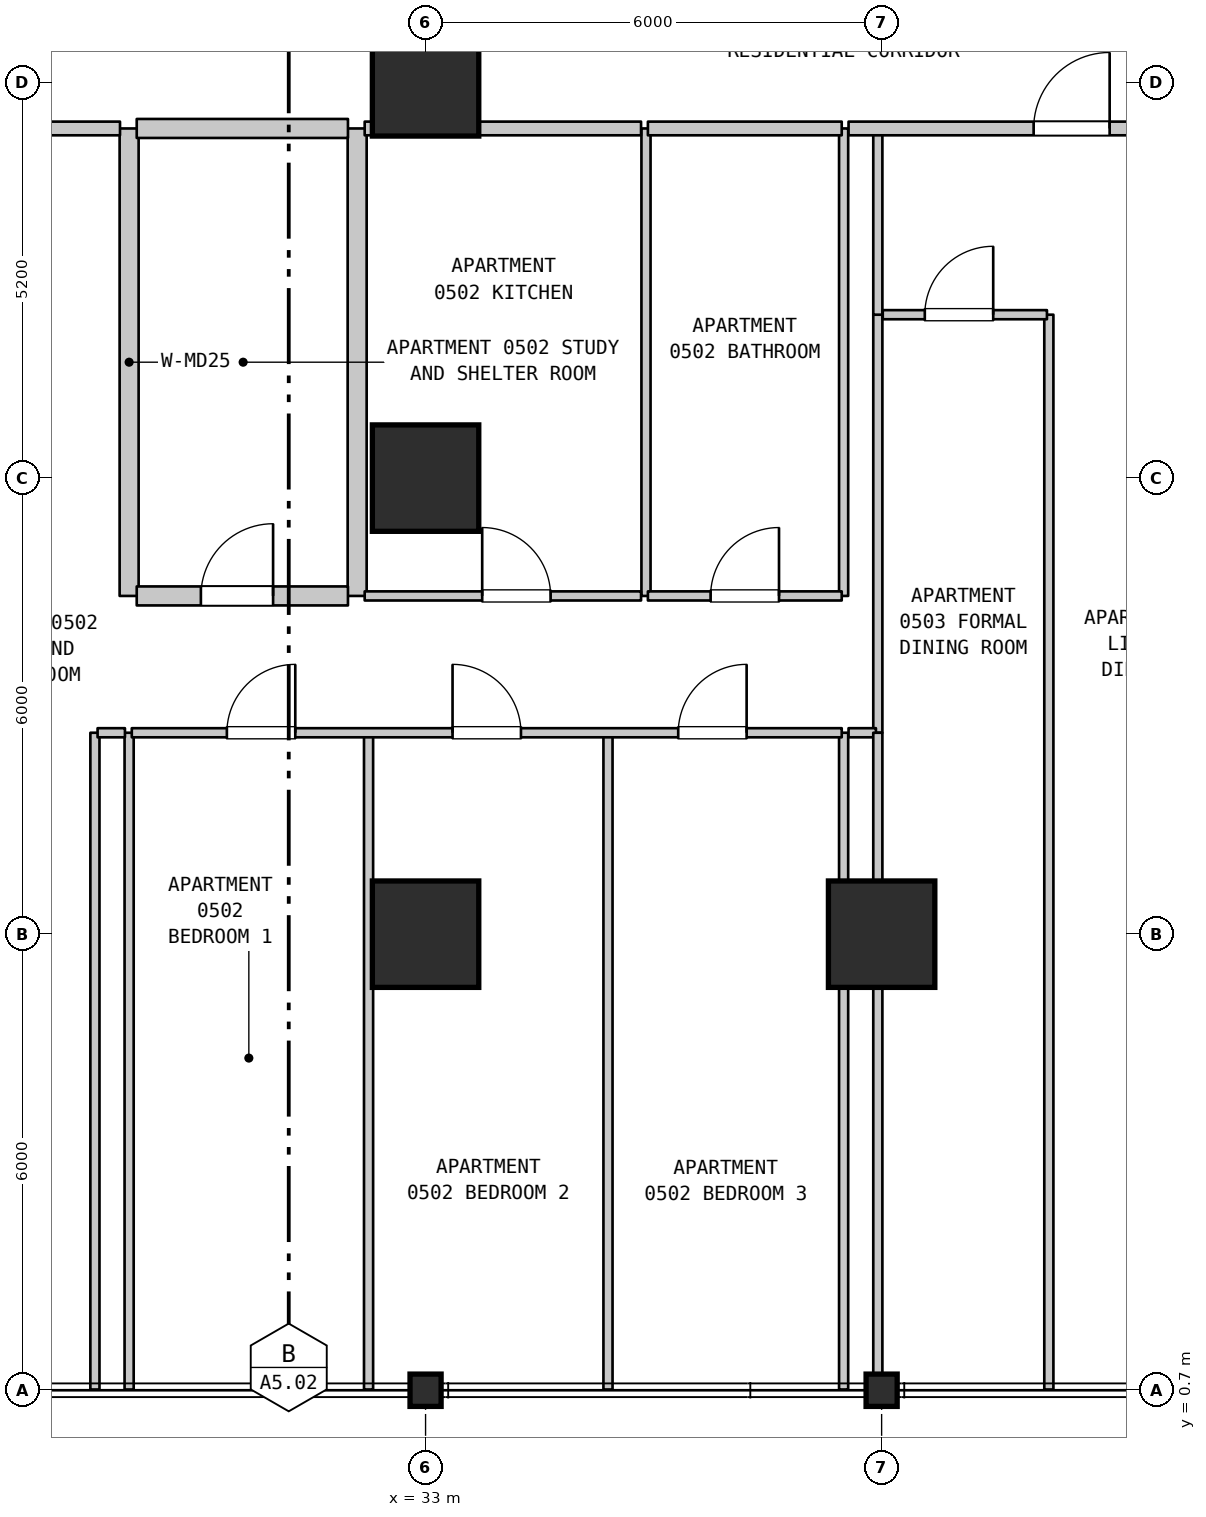
"""IFC4 building model, lengths in metres.
Left out: names, types, materials, properties, quantities, classifications, styles, units other than length and angle.
Written with IfcOpenShell. Run it as: python <this file> out.ifc"""

import sys

from ifc_helpers import new_model, si_unit, direction, frame, frame_2d, origin, origin_2d, place, context, subcontext, project, spatial, rectangle, i_section, extrude, element, fill, save


model = new_model("IFC4")
c1 = context("Model", 3, precision=1e-05, world=origin(), true_north=direction((0.0, 1.0)))
c2 = subcontext(c1, "Body", "Model", "MODEL_VIEW")
j1 = project(units=[si_unit("LENGTHUNIT", "METRE"), si_unit("PLANEANGLEUNIT", "RADIAN")], contexts=[c1])
p1 = place(None, origin())
s1 = spatial("IfcSite", under=j1, at=p1, CompositionType="ELEMENT")
p2 = place(p1, origin())
s2 = spatial("IfcBuilding", under=s1, at=p2, CompositionType="ELEMENT")
p3 = place(p2, frame((0.0, 0.0, 27.7)))
s3 = spatial("IfcBuildingStorey", under=s2, at=p3, CompositionType="ELEMENT", Elevation=27.7)
p4 = place(p3, frame((33.0, 0.7, 0.0), z_axis=(0.0, 0.0, 1.0), x_axis=(1.0, 0.0, 0.0)))
e1 = element("IfcColumn", 1, at=p4, inside=s3, PredefinedType="COLUMN", context=c2, shape_type="SweptSolid", body=[
    extrude(i_section(OverallWidth=0.409, OverallDepth=0.425, WebThickness=0.032, FlangeThickness=0.052, FilletRadius=0.015, at=origin_2d()), origin(), (0.0, 0.0, 1.0), 3.7),
])
for number, where, z_axis, x_axis in (
    (2, (33.0, 6.7, 0.0), (0.0, 0.0, 1.0), (1.0, 0.0, 0.0)),
    (3, (33.0, 12.7, 0.0), (0.0, 0.0, 1.0), (1.0, 0.0, 0.0)),
    (4, (33.0, 17.9, 0.0), (0.0, 0.0, 1.0), (1.0, 0.0, 0.0)),
):
    element("IfcColumn", number, at=place(p3, frame(where, z_axis=z_axis, x_axis=x_axis)), inside=s3, PredefinedType="COLUMN", context=c2, shape_type="SweptSolid", body=[
        extrude(rectangle(XDim=1.4, YDim=1.4, at=origin_2d()), origin(), (0.0, 0.0, 1.0), 3.7),
    ])
p5 = place(p3, frame((39.0, 0.7, 0.0), z_axis=(0.0, 0.0, 1.0), x_axis=(1.0, 0.0, 0.0)))
e5 = element("IfcColumn", 5, at=p5, inside=s3, PredefinedType="COLUMN", context=c2, shape_type="SweptSolid", body=[
    extrude(i_section(OverallWidth=0.409, OverallDepth=0.425, WebThickness=0.032, FlangeThickness=0.052, FilletRadius=0.015, at=origin_2d()), origin(), (0.0, 0.0, 1.0), 3.7),
])
p6 = place(p3, frame((39.0, 6.7, 0.0), z_axis=(0.0, 0.0, 1.0), x_axis=(1.0, 0.0, 0.0)))
e6 = element("IfcColumn", 6, at=p6, inside=s3, PredefinedType="COLUMN", context=c2, shape_type="SweptSolid", body=[
    extrude(rectangle(XDim=1.4, YDim=1.4, at=origin_2d()), origin(), (0.0, 0.0, 1.0), 3.7),
])
for number, where, z_axis, x_axis in (
    (7, (28.65, 0.71, 0.0), (0.0, 0.0, 1.0), (0.0, 1.0, 0.0)),
    (8, (29.1, 0.71, 0.0), (0.0, 0.0, 1.0), (0.0, 1.0, 0.0)),
):
    element("IfcWall", number, at=place(p3, frame(where, z_axis=z_axis, x_axis=x_axis)), inside=s3, PredefinedType="PARTITIONING", context=c2, shape_type="SweptSolid", body=[
        extrude(rectangle(XDim=8.64, YDim=0.12, at=frame_2d((4.32, 0.0))), origin(), (0.0, 0.0, 1.0), 3.385),
    ])
for number, where, z_axis, x_axis in (
    (9, (29.1, 11.15, 0.0), (0.0, 0.0, 1.0), (0.0, 1.0, 0.0)),
    (10, (32.1, 11.15, 0.0), (0.0, 0.0, 1.0), (0.0, 1.0, 0.0)),
):
    element("IfcWall", number, at=place(p3, frame(where, z_axis=z_axis, x_axis=x_axis)), inside=s3, PredefinedType="STANDARD", context=c2, shape_type="SweptSolid", body=[
        extrude(rectangle(XDim=6.15, YDim=0.25, at=frame_2d((3.075, 0.0))), origin(), (0.0, 0.0, 1.0), 3.385),
    ])
for number, where, z_axis, x_axis in (
    (11, (32.25, 0.71, 0.0), (0.0, 0.0, 1.0), (0.0, 1.0, 0.0)),
    (12, (35.4, 0.71, 0.0), (0.0, 0.0, 1.0), (0.0, 1.0, 0.0)),
):
    element("IfcWall", number, at=place(p3, frame(where, z_axis=z_axis, x_axis=x_axis)), inside=s3, PredefinedType="PARTITIONING", context=c2, shape_type="SweptSolid", body=[
        extrude(rectangle(XDim=8.64, YDim=0.12, at=frame_2d((4.32, 0.0))), origin(), (0.0, 0.0, 1.0), 3.385),
    ])
p7 = place(p3, frame((35.9, 11.15, 0.0), z_axis=(0.0, 0.0, 1.0), x_axis=(0.0, 1.0, 0.0)))
e13 = element("IfcWall", 13, at=p7, inside=s3, PredefinedType="PARTITIONING", context=c2, shape_type="SweptSolid", body=[
    extrude(rectangle(XDim=6.15, YDim=0.12, at=frame_2d((3.075, 0.0))), origin(), (0.0, 0.0, 1.0), 3.385),
])
p8 = place(p3, frame((38.5, 0.71, 0.0), z_axis=(0.0, 0.0, 1.0), x_axis=(0.0, 1.0, 0.0)))
e14 = element("IfcWall", 14, at=p8, inside=s3, PredefinedType="PARTITIONING", context=c2, shape_type="SweptSolid", body=[
    extrude(rectangle(XDim=8.64, YDim=0.12, at=frame_2d((4.32, 0.0))), origin(), (0.0, 0.0, 1.0), 3.385),
])
p9 = place(p3, frame((38.5, 11.15, 0.0), z_axis=(0.0, 0.0, 1.0), x_axis=(0.0, 1.0, 0.0)))
e15 = element("IfcWall", 15, at=p9, inside=s3, PredefinedType="PARTITIONING", context=c2, shape_type="SweptSolid", body=[
    extrude(rectangle(XDim=6.15, YDim=0.12, at=frame_2d((3.075, 0.0))), origin(), (0.0, 0.0, 1.0), 3.385),
])
p10 = place(p3, frame((38.95, 0.71, 0.0), z_axis=(0.0, 0.0, 1.0), x_axis=(0.0, 1.0, 0.0)))
e16 = element("IfcWall", 16, at=p10, inside=s3, PredefinedType="PARTITIONING", context=c2, shape_type="SweptSolid", body=[
    extrude(rectangle(XDim=5.99, YDim=0.12, at=frame_2d((2.995, 0.0))), origin(), (0.0, 0.0, 1.0), 2.885),
])
p11 = place(p3, frame((38.95, 9.35, 0.0), z_axis=(0.0, 0.0, 1.0), x_axis=(0.0, 1.0, 0.0)))
e17 = element("IfcWall", 17, at=p11, inside=s3, PredefinedType="PARTITIONING", context=c2, shape_type="SweptSolid", body=[
    extrude(rectangle(XDim=5.5, YDim=0.12, at=frame_2d((2.75, 0.0))), origin(), (0.0, 0.0, 1.0), 3.385),
])
p12 = place(p3, frame((38.95, 14.85, 0.0), z_axis=(0.0, 0.0, 1.0), x_axis=(0.0, 1.0, 0.0)))
e18 = element("IfcWall", 18, at=p12, inside=s3, PredefinedType="PARTITIONING", context=c2, shape_type="SweptSolid", body=[
    extrude(rectangle(XDim=2.45, YDim=0.12, at=frame_2d((1.225, 0.0))), origin(), (0.0, 0.0, 1.0), 3.385),
])
p13 = place(p3, frame((41.2, 0.71, 0.0), z_axis=(0.0, 0.0, 1.0), x_axis=(0.0, 1.0, 0.0)))
e19 = element("IfcWall", 19, at=p13, inside=s3, PredefinedType="PARTITIONING", context=c2, shape_type="SweptSolid", body=[
    extrude(rectangle(XDim=14.14, YDim=0.12, at=frame_2d((7.07, 0.0))), origin(), (0.0, 0.0, 1.0), 3.385),
])
p14 = place(p3, frame((28.685, 9.35, 0.0), z_axis=(0.0, 0.0, 1.0), x_axis=(1.0, 0.0, 0.0)))
e20 = element("IfcWall", 20, at=p14, inside=s3, PredefinedType="PARTITIONING", context=c2, shape_type="SweptSolid", body=[
    extrude(rectangle(XDim=0.36, YDim=0.12, at=frame_2d((0.18, 0.0))), origin(), (0.0, 0.0, 1.0), 3.385),
])
p15 = place(p3, frame((29.135, 9.35, 0.0), z_axis=(0.0, 0.0, 1.0), x_axis=(1.0, 0.0, 0.0)))
e21 = element("IfcWall", 21, at=p15, inside=s3, PredefinedType="PARTITIONING", context=c2, shape_type="SweptSolid", body=[
    extrude(rectangle(XDim=9.34, YDim=0.12, at=frame_2d((4.67, 0.0))), origin(), (0.0, 0.0, 1.0), 3.385),
])
p16 = place(p15, frame((1.251, 0.0, 0.0)))
e22 = element("IfcOpeningElement", 22, at=p16, cuts=e21, PredefinedType="OPENING", context=c2, shape_type="SweptSolid", body=[
    extrude(rectangle(XDim=0.9, YDim=2.15, at=frame_2d((0.45, 1.075))), frame((0.0, 0.07, 0.0), z_axis=(0.0, -1.0, 0.0), x_axis=(1.0, 0.0, 0.0)), (0.0, 0.0, 1.0), 0.14),
])
p17 = place(p15, frame((4.22, 0.0, 0.0)))
e23 = element("IfcOpeningElement", 23, at=p17, cuts=e21, PredefinedType="OPENING", context=c2, shape_type="SweptSolid", body=[
    extrude(rectangle(XDim=0.9, YDim=2.15, at=frame_2d((0.45, 1.075))), frame((0.0, 0.07, 0.0), z_axis=(0.0, -1.0, 0.0), x_axis=(1.0, 0.0, 0.0)), (0.0, 0.0, 1.0), 0.14),
])
p18 = place(p15, frame((7.189, 0.0, 0.0)))
e24 = element("IfcOpeningElement", 24, at=p18, cuts=e21, PredefinedType="OPENING", context=c2, shape_type="SweptSolid", body=[
    extrude(rectangle(XDim=0.9, YDim=2.15, at=frame_2d((0.45, 1.075))), frame((0.0, 0.07, 0.0), z_axis=(0.0, -1.0, 0.0), x_axis=(1.0, 0.0, 0.0)), (0.0, 0.0, 1.0), 0.14),
])
p19 = place(p3, frame((38.565, 9.35, 0.0), z_axis=(0.0, 0.0, 1.0), x_axis=(1.0, 0.0, 0.0)))
e25 = element("IfcWall", 25, at=p19, inside=s3, PredefinedType="PARTITIONING", context=c2, shape_type="SweptSolid", body=[
    extrude(rectangle(XDim=0.36, YDim=0.12, at=frame_2d((0.18, 0.0))), origin(), (0.0, 0.0, 1.0), 3.385),
])
p20 = place(p3, frame((29.2, 11.15, 0.0), z_axis=(0.0, 0.0, 1.0), x_axis=(1.0, 0.0, 0.0)))
e26 = element("IfcWall", 26, at=p20, inside=s3, PredefinedType="STANDARD", context=c2, shape_type="SweptSolid", body=[
    extrude(rectangle(XDim=2.779, YDim=0.25, at=frame_2d((1.39, 0.0))), origin(), (0.0, 0.0, 1.0), 3.385),
])
p21 = place(p20, frame((0.844, 0.0, 0.0)))
e27 = element("IfcOpeningElement", 27, at=p21, cuts=e26, PredefinedType="OPENING", context=c2, shape_type="SweptSolid", body=[
    extrude(rectangle(XDim=0.95, YDim=2.15, at=frame_2d((0.475, 1.075))), frame((0.0, 0.135, 0.0), z_axis=(0.0, -1.0, 0.0), x_axis=(1.0, 0.0, 0.0)), (0.0, 0.0, 1.0), 0.27),
])
p22 = place(p3, frame((32.199, 11.15, 0.0), z_axis=(0.0, 0.0, 1.0), x_axis=(1.0, 0.0, 0.0)))
e28 = element("IfcWall", 28, at=p22, inside=s3, PredefinedType="PARTITIONING", context=c2, shape_type="SweptSolid", body=[
    extrude(rectangle(XDim=3.636, YDim=0.12, at=frame_2d((1.818, 0.0))), origin(), (0.0, 0.0, 1.0), 3.385),
])
p23 = place(p22, frame((1.546, 0.0, 0.0)))
e29 = element("IfcOpeningElement", 29, at=p23, cuts=e28, PredefinedType="OPENING", context=c2, shape_type="SweptSolid", body=[
    extrude(rectangle(XDim=0.9, YDim=2.15, at=frame_2d((0.45, 1.075))), frame((0.0, 0.07, 0.0), z_axis=(0.0, -1.0, 0.0), x_axis=(1.0, 0.0, 0.0)), (0.0, 0.0, 1.0), 0.14),
])
p24 = place(p3, frame((35.925, 11.15, 0.0), z_axis=(0.0, 0.0, 1.0), x_axis=(1.0, 0.0, 0.0)))
e30 = element("IfcWall", 30, at=p24, inside=s3, PredefinedType="PARTITIONING", context=c2, shape_type="SweptSolid", body=[
    extrude(rectangle(XDim=2.55, YDim=0.12, at=frame_2d((1.275, 0.0))), origin(), (0.0, 0.0, 1.0), 3.385),
])
p25 = place(p24, frame((0.825, 0.0, 0.0)))
e31 = element("IfcOpeningElement", 31, at=p25, cuts=e30, PredefinedType="OPENING", context=c2, shape_type="SweptSolid", body=[
    extrude(rectangle(XDim=0.9, YDim=2.1, at=frame_2d((0.45, 1.05))), frame((0.0, 0.07, 0.0), z_axis=(0.0, -1.0, 0.0), x_axis=(1.0, 0.0, 0.0)), (0.0, 0.0, 1.0), 0.14),
])
p26 = place(p3, frame((39.015, 14.85, 0.0), z_axis=(0.0, 0.0, 1.0), x_axis=(1.0, 0.0, 0.0)))
e32 = element("IfcWall", 32, at=p26, inside=s3, PredefinedType="PARTITIONING", context=c2, shape_type="SweptSolid", body=[
    extrude(rectangle(XDim=2.16, YDim=0.12, at=frame_2d((1.08, 0.0))), origin(), (0.0, 0.0, 1.0), 3.385),
])
p27 = place(p26, frame((0.553, 0.0, 0.0)))
e33 = element("IfcOpeningElement", 33, at=p27, cuts=e32, PredefinedType="OPENING", context=c2, shape_type="SweptSolid", body=[
    extrude(rectangle(XDim=0.9, YDim=2.15, at=frame_2d((0.45, 1.075))), frame((0.0, 0.07, 0.0), z_axis=(0.0, -1.0, 0.0), x_axis=(1.0, 0.0, 0.0)), (0.0, 0.0, 1.0), 0.14),
])
p28 = place(p3, frame((23.885, 17.3, 0.0), z_axis=(0.0, 0.0, 1.0), x_axis=(1.0, 0.0, 0.0)))
e34 = element("IfcWall", 34, at=p28, inside=s3, PredefinedType="STANDARD", context=c2, shape_type="SweptSolid", body=[
    extrude(rectangle(XDim=5.095, YDim=0.18, at=frame_2d((2.547, 0.0))), origin(), (0.0, 0.0, 1.0), 3.385),
])
p29 = place(p28, frame((2.08, 0.0, 0.0)))
e35 = element("IfcOpeningElement", 35, at=p29, cuts=e34, PredefinedType="OPENING", context=c2, shape_type="SweptSolid", body=[
    extrude(rectangle(XDim=1.0, YDim=2.15, at=frame_2d((0.5, 1.075))), frame((0.0, 0.1, 0.0), z_axis=(0.0, -1.0, 0.0), x_axis=(1.0, 0.0, 0.0)), (0.0, 0.0, 1.0), 0.2),
])
p30 = place(p3, frame((29.2, 17.3, 0.0), z_axis=(0.0, 0.0, 1.0), x_axis=(1.0, 0.0, 0.0)))
e36 = element("IfcWall", 36, at=p30, inside=s3, PredefinedType="STANDARD", context=c2, shape_type="SweptSolid", body=[
    extrude(rectangle(XDim=2.779, YDim=0.25, at=frame_2d((1.39, 0.0))), origin(), (0.0, 0.0, 1.0), 3.385),
])
p31 = place(p3, frame((32.199, 17.3, 0.0), z_axis=(0.0, 0.0, 1.0), x_axis=(1.0, 0.0, 0.0)))
e37 = element("IfcWall", 37, at=p31, inside=s3, PredefinedType="STANDARD", context=c2, shape_type="SweptSolid", body=[
    extrude(rectangle(XDim=3.636, YDim=0.18, at=frame_2d((1.818, 0.0))), origin(), (0.0, 0.0, 1.0), 3.385),
])
p32 = place(p3, frame((35.925, 17.3, 0.0), z_axis=(0.0, 0.0, 1.0), x_axis=(1.0, 0.0, 0.0)))
e38 = element("IfcWall", 38, at=p32, inside=s3, PredefinedType="STANDARD", context=c2, shape_type="SweptSolid", body=[
    extrude(rectangle(XDim=2.55, YDim=0.18, at=frame_2d((1.275, 0.0))), origin(), (0.0, 0.0, 1.0), 3.385),
])
p33 = place(p3, frame((38.565, 17.3, 0.0), z_axis=(0.0, 0.0, 1.0), x_axis=(1.0, 0.0, 0.0)))
e39 = element("IfcWall", 39, at=p33, inside=s3, PredefinedType="STANDARD", context=c2, shape_type="SweptSolid", body=[
    extrude(rectangle(XDim=5.545, YDim=0.18, at=frame_2d((2.772, 0.0))), origin(), (0.0, 0.0, 1.0), 3.385),
])
p34 = place(p33, frame((2.435, 0.0, 0.0)))
e40 = element("IfcOpeningElement", 40, at=p34, cuts=e39, PredefinedType="OPENING", context=c2, shape_type="SweptSolid", body=[
    extrude(rectangle(XDim=1.0, YDim=2.15, at=frame_2d((0.5, 1.075))), frame((0.0, 0.1, 0.0), z_axis=(0.0, -1.0, 0.0), x_axis=(1.0, 0.0, 0.0)), (0.0, 0.0, 1.0), 0.2),
])
p35 = place(p3, frame((38.95, 6.7, 0.0), z_axis=(0.0, 0.0, 1.0), x_axis=(0.0, 1.0, 0.0)))
e41 = element("IfcWall", 41, at=p35, inside=s3, PredefinedType="PARTITIONING", context=c2, shape_type="SweptSolid", body=[
    extrude(rectangle(XDim=2.65, YDim=0.12, at=frame_2d((1.325, 0.0))), origin(), (0.0, 0.0, 1.0), 3.385),
])
p36 = place(p16, origin())
e42 = element("IfcDoor", 42, at=p36, inside=s3, OperationType="SINGLE_SWING_RIGHT", PredefinedType="DOOR", context=c2, shape_type="SweptSolid", body=[
    extrude(rectangle(XDim=0.9, YDim=2.15, at=frame_2d((0.45, 1.075))), frame((0.0, 0.025, 0.0), z_axis=(0.0, -1.0, 0.0), x_axis=(1.0, 0.0, 0.0)), (0.0, 0.0, 1.0), 0.05),
])
fill(e22, e42)
p37 = place(p17, origin())
e43 = element("IfcDoor", 43, at=p37, inside=s3, OperationType="SINGLE_SWING_LEFT", PredefinedType="DOOR", context=c2, shape_type="SweptSolid", body=[
    extrude(rectangle(XDim=0.9, YDim=2.15, at=frame_2d((0.45, 1.075))), frame((0.0, 0.025, 0.0), z_axis=(0.0, -1.0, 0.0), x_axis=(1.0, 0.0, 0.0)), (0.0, 0.0, 1.0), 0.05),
])
fill(e23, e43)
p38 = place(p18, origin())
e44 = element("IfcDoor", 44, at=p38, inside=s3, OperationType="SINGLE_SWING_RIGHT", PredefinedType="DOOR", context=c2, shape_type="SweptSolid", body=[
    extrude(rectangle(XDim=0.9, YDim=2.15, at=frame_2d((0.45, 1.075))), frame((0.0, 0.025, 0.0), z_axis=(0.0, -1.0, 0.0), x_axis=(1.0, 0.0, 0.0)), (0.0, 0.0, 1.0), 0.05),
])
fill(e24, e44)
p39 = place(p21, origin())
e45 = element("IfcDoor", 45, at=p39, inside=s3, OperationType="SINGLE_SWING_RIGHT", PredefinedType="DOOR", context=c2, shape_type="SweptSolid", body=[
    extrude(rectangle(XDim=0.95, YDim=2.15, at=frame_2d((0.475, 1.075))), frame((0.0, 0.025, 0.0), z_axis=(0.0, -1.0, 0.0), x_axis=(1.0, 0.0, 0.0)), (0.0, 0.0, 1.0), 0.05),
])
fill(e27, e45)
p40 = place(p23, origin())
e46 = element("IfcDoor", 46, at=p40, inside=s3, OperationType="SINGLE_SWING_LEFT", PredefinedType="DOOR", context=c2, shape_type="SweptSolid", body=[
    extrude(rectangle(XDim=0.9, YDim=2.15, at=frame_2d((0.45, 1.075))), frame((0.0, 0.025, 0.0), z_axis=(0.0, -1.0, 0.0), x_axis=(1.0, 0.0, 0.0)), (0.0, 0.0, 1.0), 0.05),
])
fill(e29, e46)
p41 = place(p25, origin())
e47 = element("IfcDoor", 47, at=p41, inside=s3, OperationType="SINGLE_SWING_RIGHT", PredefinedType="DOOR", context=c2, shape_type="SweptSolid", body=[
    extrude(rectangle(XDim=0.9, YDim=2.1, at=frame_2d((0.45, 1.05))), frame((0.0, 0.025, 0.0), z_axis=(0.0, -1.0, 0.0), x_axis=(1.0, 0.0, 0.0)), (0.0, 0.0, 1.0), 0.05),
])
fill(e31, e47)
p42 = place(p27, origin())
e48 = element("IfcDoor", 48, at=p42, inside=s3, OperationType="SINGLE_SWING_RIGHT", PredefinedType="DOOR", context=c2, shape_type="SweptSolid", body=[
    extrude(rectangle(XDim=0.9, YDim=2.15, at=frame_2d((0.45, 1.075))), frame((0.0, 0.025, 0.0), z_axis=(0.0, -1.0, 0.0), x_axis=(1.0, 0.0, 0.0)), (0.0, 0.0, 1.0), 0.05),
])
fill(e33, e48)
p43 = place(p34, origin())
e49 = element("IfcDoor", 49, at=p43, inside=s3, OperationType="SINGLE_SWING_RIGHT", PredefinedType="DOOR", context=c2, shape_type="SweptSolid", body=[
    extrude(rectangle(XDim=1.0, YDim=2.15, at=frame_2d((0.5, 1.075))), frame((0.0, 0.025, 0.0), z_axis=(0.0, -1.0, 0.0), x_axis=(1.0, 0.0, 0.0)), (0.0, 0.0, 1.0), 0.05),
])
fill(e40, e49)
save(model, sys.argv[1])
